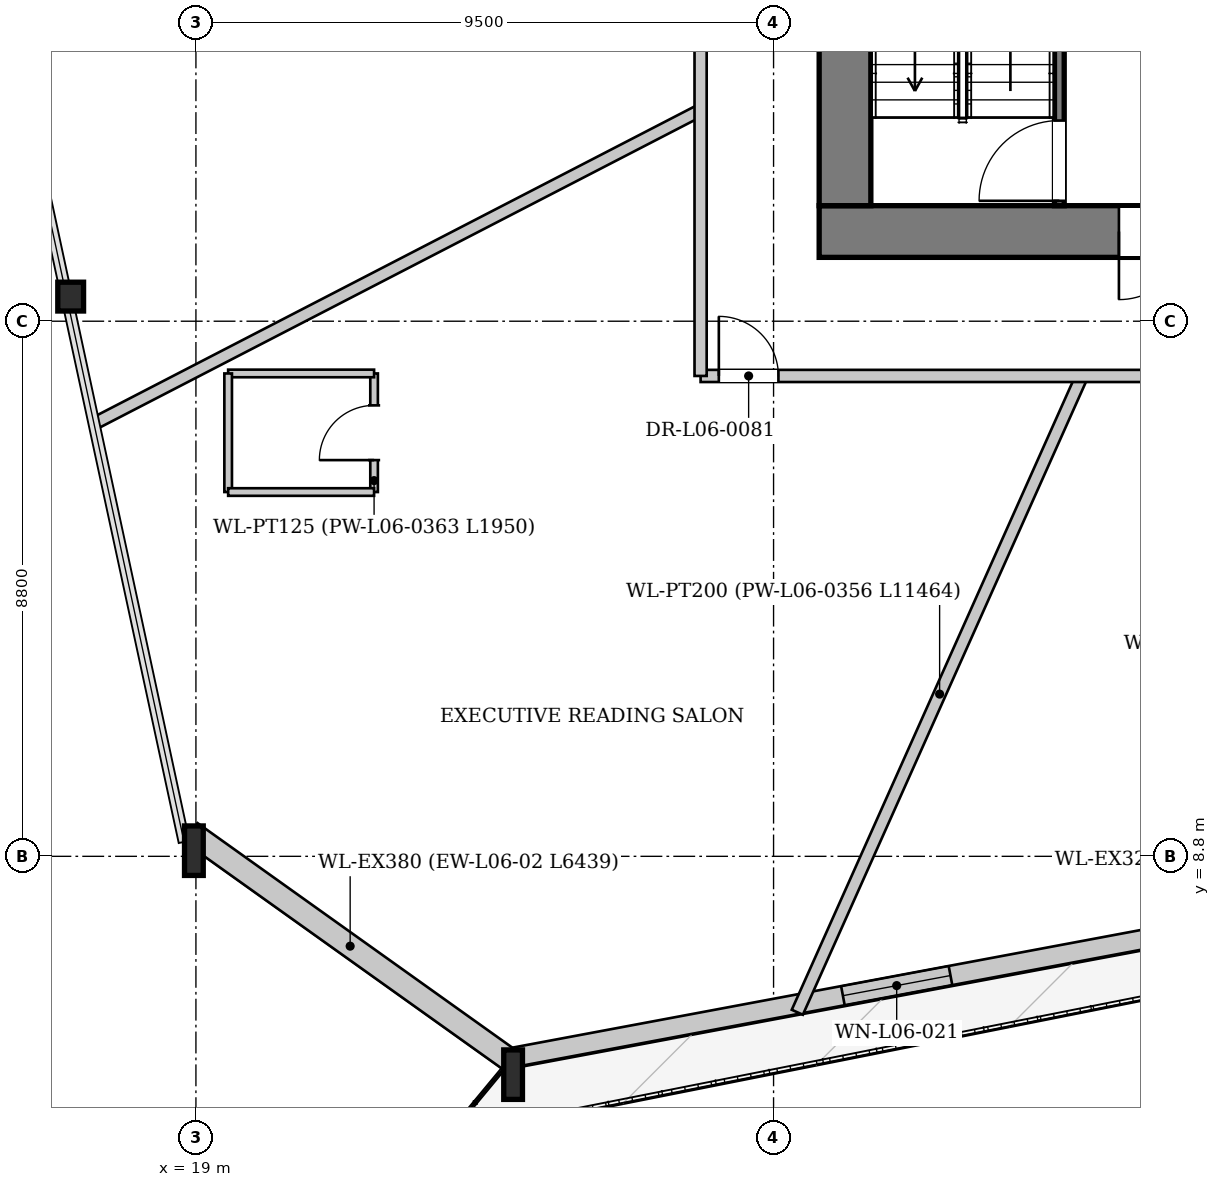
"""IFC4 building model, lengths in metres.
Left out: names, types, materials, properties, quantities, classifications, styles, units other than length and angle.
Written with IfcOpenShell. Run it as: python <this file> out.ifc"""

import sys

from ifc_helpers import new_model, si_unit, direction, frame, frame_2d, origin, origin_2d, place, context, subcontext, project, spatial, rectangle, i_section, extrude, source, transform, mapped, element, fill, save


model = new_model("IFC4")
c1 = context("Model", 3, precision=1e-05, world=origin(), true_north=direction((0.0, 1.0)))
c2 = subcontext(c1, "Body", "Model", "MODEL_VIEW")
j1 = project(units=[si_unit("LENGTHUNIT", "METRE"), si_unit("PLANEANGLEUNIT", "RADIAN")], contexts=[c1])
p1 = place(None, origin())
s1 = spatial("IfcSite", under=j1, at=p1, CompositionType="ELEMENT")
p2 = place(p1, origin())
s2 = spatial("IfcBuilding", under=s1, at=p2, CompositionType="ELEMENT")
p3 = place(p2, frame((0.0, 0.0, 29.3)))
s3 = spatial("IfcBuildingStorey", under=s2, at=p3, CompositionType="ELEMENT", Elevation=29.3)
m1 = source(origin(), c2, "Body", "SweptSolid", [
    extrude(i_section(OverallWidth=0.424, OverallDepth=0.474, WebThickness=0.043, FlangeThickness=0.068, at=origin_2d()), origin(), (0.0, 0.0, 1.0), 3.407),
])
p4 = place(p3, frame((16.838, 18.168, 0.0), z_axis=(0.059978851438, -0.096166808399, 0.993556481707), x_axis=(0.848495215225, 0.529203051522, 0.0)))
e1 = element("IfcColumn", 1, at=p4, inside=s3, PredefinedType="COLUMN", context=c2, shape_type="MappedRepresentation", body=[
    mapped(m1, transform((0.0, 0.0, 0.0), x_axis=(1.0, 0.0, 0.0), y_axis=(0.0, 1.0, 0.0), z_axis=(0.0, 0.0, 1.0), scale=1.0)),
])
m2 = source(origin(), c2, "Body", "SweptSolid", [
    extrude(i_section(OverallWidth=0.308, OverallDepth=0.814, WebThickness=0.021, FlangeThickness=0.04, at=origin_2d()), origin(), (0.0, 0.0, 1.0), 3.413),
])
p5 = place(p3, frame((18.805, 9.038, 0.0), z_axis=(0.094504351121, -0.084846449985, 0.991902216725), x_axis=(0.668061729944, 0.744105856034, 0.0)))
e2 = element("IfcColumn", 2, at=p5, inside=s3, PredefinedType="COLUMN", context=c2, shape_type="MappedRepresentation", body=[
    mapped(m2, transform((0.0, 0.0, 0.0), x_axis=(1.0, 0.0, 0.0), y_axis=(0.0, 1.0, 0.0), z_axis=(0.0, 0.0, 1.0), scale=1.0)),
])
m3 = source(origin(), c2, "Body", "SweptSolid", [
    extrude(i_section(OverallWidth=0.308, OverallDepth=0.814, WebThickness=0.021, FlangeThickness=0.04, at=origin_2d()), origin(), (0.0, 0.0, 1.0), 3.406),
])
p6 = place(p3, frame((24.047, 5.298, 0.0), z_axis=(0.099404044519, -0.052102913025, 0.993682103284), x_axis=(0.464245592076, 0.885706514731, 0.0)))
e3 = element("IfcColumn", 3, at=p6, inside=s3, PredefinedType="COLUMN", context=c2, shape_type="MappedRepresentation", body=[
    mapped(m3, transform((0.0, 0.0, 0.0), x_axis=(1.0, 0.0, 0.0), y_axis=(0.0, 1.0, 0.0), z_axis=(0.0, 0.0, 1.0), scale=1.0)),
])
p7 = place(p3, frame((48.289, 10.0, 0.0), z_axis=(0.0, 0.0, 1.0), x_axis=(-0.9829231884, -0.184016319129, 0.0)))
e4 = element("IfcWall", 4, at=p7, inside=s3, PredefinedType="SOLIDWALL", context=c2, shape_type="SweptSolid", body=[
    extrude(rectangle(XDim=24.693, YDim=0.32, at=frame_2d((12.347, 0.0))), origin(), (0.0, 0.0, 1.0), 2.592),
])
p8 = place(p7, frame((7.352, 0.0, 0.0)))
e5 = element("IfcOpeningElement", 5, at=p8, cuts=e4, PredefinedType="OPENING", context=c2, shape_type="SweptSolid", body=[
    extrude(rectangle(XDim=1.1, YDim=2.3, at=frame_2d((0.55, 1.15))), frame((0.0, 0.17, 0.0), z_axis=(0.0, -1.0, 0.0), x_axis=(1.0, 0.0, 0.0)), (0.0, 0.0, 1.0), 0.34),
])
p9 = place(p7, frame((17.173, 0.0, 0.272)))
e6 = element("IfcOpeningElement", 6, at=p9, cuts=e4, PredefinedType="OPENING", context=c2, shape_type="SweptSolid", body=[
    extrude(rectangle(XDim=1.8, YDim=2.2, at=frame_2d((0.9, 1.1))), frame((0.0, 0.17, 0.0), z_axis=(0.0, -1.0, 0.0), x_axis=(1.0, 0.0, 0.0)), (0.0, 0.0, 1.0), 0.34),
])
p10 = place(p3, frame((24.157, 5.453, 0.0), z_axis=(0.0, 0.0, 1.0), x_axis=(-0.814117588061, 0.58070005408, 0.0)))
e7 = element("IfcWall", 7, at=p10, inside=s3, PredefinedType="SOLIDWALL", context=c2, shape_type="SweptSolid", body=[
    extrude(rectangle(XDim=6.439, YDim=0.38, at=frame_2d((3.219, 0.0))), origin(), (0.0, 0.0, 1.0), 2.592),
])
p11 = place(p3, frame((46.75, 19.075, 0.0), z_axis=(0.0, 0.0, 1.0), x_axis=(-1.0, 0.0, 0.0)))
e8 = element("IfcWall", 8, at=p11, inside=s3, PredefinedType="SHEAR", context=c2, shape_type="SweptSolid", body=[
    extrude(rectangle(XDim=17.5, YDim=0.85, at=frame_2d((8.75, 0.0))), origin(), (0.0, 0.0, 1.0), 3.3),
])
p12 = place(p11, frame((4.95, 0.0, 0.0)))
e9 = element("IfcOpeningElement", 9, at=p12, cuts=e8, PredefinedType="OPENING", context=c2, shape_type="SweptSolid", body=[
    extrude(rectangle(XDim=1.12, YDim=2.25, at=frame_2d((0.56, 1.125))), frame((0.0, 0.435, 0.0), z_axis=(0.0, -1.0, 0.0), x_axis=(1.0, 0.0, 0.0)), (0.0, 0.0, 1.0), 0.87),
])
p13 = place(p11, frame((11.45, 0.0, 0.0)))
e10 = element("IfcOpeningElement", 10, at=p13, cuts=e8, PredefinedType="OPENING", context=c2, shape_type="SweptSolid", body=[
    extrude(rectangle(XDim=1.12, YDim=2.25, at=frame_2d((0.56, 1.125))), frame((0.0, 0.435, 0.0), z_axis=(0.0, -1.0, 0.0), x_axis=(1.0, 0.0, 0.0)), (0.0, 0.0, 1.0), 0.87),
])
p14 = place(p3, frame((29.675, 19.5, 0.0), z_axis=(0.0, 0.0, 1.0), x_axis=(0.0, 1.0, 0.0)))
e11 = element("IfcWall", 11, at=p14, inside=s3, PredefinedType="SHEAR", context=c2, shape_type="SweptSolid", body=[
    extrude(rectangle(XDim=14.2, YDim=0.85, at=frame_2d((7.1, 0.0))), origin(), (0.0, 0.0, 1.0), 3.3),
])
p15 = place(p14, frame((7.42, 0.0, 0.0)))
e12 = element("IfcOpeningElement", 12, at=p15, cuts=e11, PredefinedType="OPENING", context=c2, shape_type="SweptSolid", body=[
    extrude(rectangle(XDim=1.6, YDim=2.2, at=frame_2d((0.8, 1.1))), frame((0.0, 0.435, 0.0), z_axis=(0.0, -1.0, 0.0), x_axis=(1.0, 0.0, 0.0)), (0.0, 0.0, 1.0), 0.87),
])
p16 = place(p3, frame((33.2, 19.5, 0.0), z_axis=(0.0, 0.0, 1.0), x_axis=(0.0, 1.0, 0.0)))
e13 = element("IfcWall", 13, at=p16, inside=s3, PredefinedType="PARTITIONING", context=c2, shape_type="SweptSolid", body=[
    extrude(rectangle(XDim=7.46, YDim=0.16, at=frame_2d((3.73, 0.0))), origin(), (0.0, 0.0, 1.0), 3.3),
])
p17 = place(p16, frame((0.08, 0.0, 0.0)))
e14 = element("IfcOpeningElement", 14, at=p17, cuts=e13, PredefinedType="OPENING", context=c2, shape_type="SweptSolid", body=[
    extrude(rectangle(XDim=1.32, YDim=2.2, at=frame_2d((0.66, 1.1))), frame((0.0, 0.09, 0.0), z_axis=(0.0, -1.0, 0.0), x_axis=(1.0, 0.0, 0.0)), (0.0, 0.0, 1.0), 0.18),
])
p18 = place(p3, frame((33.572, 16.7, 0.0), z_axis=(0.0, 0.0, 1.0), x_axis=(-0.40832870075, -0.912834964352, 0.0)))
e15 = element("IfcWall", 15, at=p18, inside=s3, PredefinedType="PARTITIONING", context=c2, shape_type="SweptSolid", body=[
    extrude(rectangle(XDim=11.464, YDim=0.2, at=frame_2d((5.732, 0.0))), origin(), (0.0, 0.0, 1.0), 3.3),
])
p19 = place(p3, frame((27.3, 21.071, 0.0), z_axis=(0.0, 0.0, 1.0), x_axis=(-0.888387527234, -0.459094327404, 0.0)))
e16 = element("IfcWall", 16, at=p19, inside=s3, PredefinedType="PARTITIONING", context=c2, shape_type="SweptSolid", body=[
    extrude(rectangle(XDim=11.199, YDim=0.2, at=frame_2d((5.6, 0.0))), origin(), (0.0, 0.0, 1.0), 3.3),
])
p20 = place(p3, frame((21.93, 14.791, 0.0), z_axis=(0.0, 0.0, 1.0), x_axis=(0.0, 1.0, 0.0)))
e17 = element("IfcWall", 17, at=p20, inside=s3, PredefinedType="PARTITIONING", context=c2, shape_type="SweptSolid", body=[
    extrude(rectangle(XDim=1.95, YDim=0.125, at=frame_2d((0.975, 0.0))), origin(), (0.0, 0.0, 1.0), 3.3),
])
p21 = place(p20, frame((0.525, 0.0, 0.0)))
e18 = element("IfcOpeningElement", 18, at=p21, cuts=e17, PredefinedType="OPENING", context=c2, shape_type="SweptSolid", body=[
    extrude(rectangle(XDim=0.9, YDim=2.1, at=frame_2d((0.45, 1.05))), frame((0.0, 0.073, 0.0), z_axis=(0.0, -1.0, 0.0), x_axis=(1.0, 0.0, 0.0)), (0.0, 0.0, 1.0), 0.145),
])
p22 = place(p3, frame((21.93, 16.741, 0.0), z_axis=(0.0, 0.0, 1.0), x_axis=(-1.0, 0.0, 0.0)))
e19 = element("IfcWall", 19, at=p22, inside=s3, PredefinedType="PARTITIONING", context=c2, shape_type="SweptSolid", body=[
    extrude(rectangle(XDim=2.4, YDim=0.125, at=frame_2d((1.2, 0.0))), origin(), (0.0, 0.0, 1.0), 3.3),
])
p23 = place(p3, frame((19.53, 16.741, 0.0), z_axis=(0.0, 0.0, 1.0), x_axis=(0.0, -1.0, 0.0)))
e20 = element("IfcWall", 20, at=p23, inside=s3, PredefinedType="PARTITIONING", context=c2, shape_type="SweptSolid", body=[
    extrude(rectangle(XDim=1.95, YDim=0.125, at=frame_2d((0.975, 0.0))), origin(), (0.0, 0.0, 1.0), 3.3),
])
p24 = place(p3, frame((19.53, 14.791, 0.0), z_axis=(0.0, 0.0, 1.0), x_axis=(1.0, 0.0, 0.0)))
e21 = element("IfcWall", 21, at=p24, inside=s3, PredefinedType="PARTITIONING", context=c2, shape_type="SweptSolid", body=[
    extrude(rectangle(XDim=2.4, YDim=0.125, at=frame_2d((1.2, 0.0))), origin(), (0.0, 0.0, 1.0), 3.3),
])
p25 = place(p3, frame((27.3, 16.7, 0.0), z_axis=(0.0, 0.0, 1.0), x_axis=(1.0, 0.0, 0.0)))
e22 = element("IfcWall", 22, at=p25, inside=s3, PredefinedType="PARTITIONING", context=c2, shape_type="SweptSolid", body=[
    extrude(rectangle(XDim=21.4, YDim=0.2, at=frame_2d((10.7, 0.0))), origin(), (0.0, 0.0, 1.0), 3.3),
])
p26 = place(p25, frame((11.651, 0.0, 0.0)))
e23 = element("IfcOpeningElement", 23, at=p26, cuts=e22, PredefinedType="OPENING", context=c2, shape_type="SweptSolid", body=[
    extrude(rectangle(XDim=0.98, YDim=2.15, at=frame_2d((0.49, 1.075))), frame((0.0, 0.11, 0.0), z_axis=(0.0, -1.0, 0.0), x_axis=(1.0, 0.0, 0.0)), (0.0, 0.0, 1.0), 0.22),
])
p27 = place(p25, frame((20.12, 0.0, 0.0)))
e24 = element("IfcOpeningElement", 24, at=p27, cuts=e22, PredefinedType="OPENING", context=c2, shape_type="SweptSolid", body=[
    extrude(rectangle(XDim=0.98, YDim=2.15, at=frame_2d((0.49, 1.075))), frame((0.0, 0.11, 0.0), z_axis=(0.0, -1.0, 0.0), x_axis=(1.0, 0.0, 0.0)), (0.0, 0.0, 1.0), 0.22),
])
p28 = place(p25, frame((0.3, 0.0, 0.0)))
e25 = element("IfcOpeningElement", 25, at=p28, cuts=e22, PredefinedType="OPENING", context=c2, shape_type="SweptSolid", body=[
    extrude(rectangle(XDim=0.98, YDim=2.15, at=frame_2d((0.49, 1.075))), frame((0.0, 0.11, 0.0), z_axis=(0.0, -1.0, 0.0), x_axis=(1.0, 0.0, 0.0)), (0.0, 0.0, 1.0), 0.22),
])
p29 = place(p3, frame((27.3, 16.7, 0.0), z_axis=(0.0, 0.0, 1.0), x_axis=(0.0, 1.0, 0.0)))
e26 = element("IfcWall", 26, at=p29, inside=s3, PredefinedType="PARTITIONING", context=c2, shape_type="SweptSolid", body=[
    extrude(rectangle(XDim=19.8, YDim=0.2, at=frame_2d((9.9, 0.0))), origin(), (0.0, 0.0, 1.0), 3.3),
])
p30 = place(p29, frame((18.52, 0.0, 0.0)))
e27 = element("IfcOpeningElement", 27, at=p30, cuts=e26, PredefinedType="OPENING", context=c2, shape_type="SweptSolid", body=[
    extrude(rectangle(XDim=0.98, YDim=2.15, at=frame_2d((0.49, 1.075))), frame((0.0, 0.11, 0.0), z_axis=(0.0, -1.0, 0.0), x_axis=(1.0, 0.0, 0.0)), (0.0, 0.0, 1.0), 0.22),
])
p31 = place(p29, frame((6.96, 0.0, 0.0)))
e28 = element("IfcOpeningElement", 28, at=p31, cuts=e26, PredefinedType="OPENING", context=c2, shape_type="SweptSolid", body=[
    extrude(rectangle(XDim=0.98, YDim=2.15, at=frame_2d((0.49, 1.075))), frame((0.0, 0.11, 0.0), z_axis=(0.0, -1.0, 0.0), x_axis=(1.0, 0.0, 0.0)), (0.0, 0.0, 1.0), 0.22),
])
m4 = source(origin(), c2, "Body", "SweptSolid", [
    extrude(rectangle(XDim=1.8, YDim=2.2, at=frame_2d((0.9, 1.1))), frame((0.0, 0.03, 0.0), z_axis=(0.0, -1.0, 0.0), x_axis=(1.0, 0.0, 0.0)), (0.0, 0.0, 1.0), 0.06),
])
p32 = place(p9, origin())
e29 = element("IfcWindow", 29, at=p32, inside=s3, PartitioningType="SINGLE_PANEL", PredefinedType="WINDOW", context=c2, shape_type="MappedRepresentation", body=[
    mapped(m4, transform((0.0, 0.0, 0.0), x_axis=(1.0, 0.0, 0.0), y_axis=(0.0, 1.0, 0.0), z_axis=(0.0, 0.0, 1.0), scale=1.0)),
])
fill(e6, e29)
m5 = source(origin(), c2, "Body", "SweptSolid", [
    extrude(rectangle(XDim=1.12, YDim=2.25, at=frame_2d((0.56, 1.125))), frame((0.0, 0.025, 0.0), z_axis=(0.0, -1.0, 0.0), x_axis=(1.0, 0.0, 0.0)), (0.0, 0.0, 1.0), 0.05),
])
p33 = place(p13, origin())
e30 = element("IfcDoor", 30, at=p33, inside=s3, OperationType="SINGLE_SWING_RIGHT", PredefinedType="DOOR", context=c2, shape_type="MappedRepresentation", body=[
    mapped(m5, transform((0.0, 0.0, 0.0), x_axis=(1.0, 0.0, 0.0), y_axis=(0.0, 1.0, 0.0), z_axis=(0.0, 0.0, 1.0), scale=1.0)),
])
fill(e10, e30)
m6 = source(origin(), c2, "Body", "SweptSolid", [
    extrude(rectangle(XDim=1.32, YDim=2.2, at=frame_2d((0.66, 1.1))), frame((0.0, 0.025, 0.0), z_axis=(0.0, -1.0, 0.0), x_axis=(1.0, 0.0, 0.0)), (0.0, 0.0, 1.0), 0.05),
])
p34 = place(p17, origin())
e31 = element("IfcDoor", 31, at=p34, inside=s3, OperationType="SINGLE_SWING_LEFT", PredefinedType="DOOR", context=c2, shape_type="MappedRepresentation", body=[
    mapped(m6, transform((0.0, 0.0, 0.0), x_axis=(1.0, 0.0, 0.0), y_axis=(0.0, 1.0, 0.0), z_axis=(0.0, 0.0, 1.0), scale=1.0)),
])
fill(e14, e31)
m7 = source(origin(), c2, "Body", "SweptSolid", [
    extrude(rectangle(XDim=0.9, YDim=2.1, at=frame_2d((0.45, 1.05))), frame((0.0, 0.025, 0.0), z_axis=(0.0, -1.0, 0.0), x_axis=(1.0, 0.0, 0.0)), (0.0, 0.0, 1.0), 0.05),
])
p35 = place(p21, origin())
e32 = element("IfcDoor", 32, at=p35, inside=s3, OperationType="SINGLE_SWING_LEFT", PredefinedType="DOOR", context=c2, shape_type="MappedRepresentation", body=[
    mapped(m7, transform((0.0, 0.0, 0.0), x_axis=(1.0, 0.0, 0.0), y_axis=(0.0, 1.0, 0.0), z_axis=(0.0, 0.0, 1.0), scale=1.0)),
])
fill(e18, e32)
m8 = source(origin(), c2, "Body", "SweptSolid", [
    extrude(rectangle(XDim=0.98, YDim=2.15, at=frame_2d((0.49, 1.075))), frame((0.0, 0.025, 0.0), z_axis=(0.0, -1.0, 0.0), x_axis=(1.0, 0.0, 0.0)), (0.0, 0.0, 1.0), 0.05),
])
p36 = place(p28, origin())
e33 = element("IfcDoor", 33, at=p36, inside=s3, OperationType="SINGLE_SWING_LEFT", PredefinedType="DOOR", context=c2, shape_type="MappedRepresentation", body=[
    mapped(m8, transform((0.0, 0.0, 0.0), x_axis=(1.0, 0.0, 0.0), y_axis=(0.0, 1.0, 0.0), z_axis=(0.0, 0.0, 1.0), scale=1.0)),
])
fill(e25, e33)
save(model, sys.argv[1])
